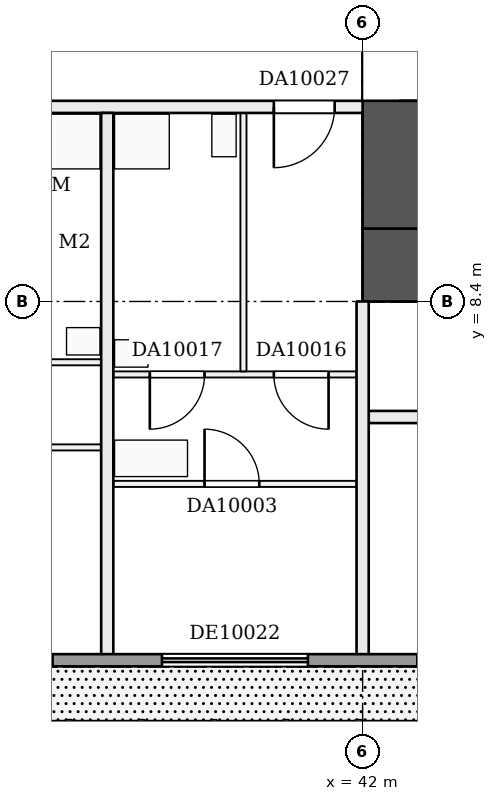
"""IFC4 building model, lengths in metres.
Left out: names, types, materials, properties, quantities, classifications, styles, units other than length and angle.
Written with IfcOpenShell. Run it as: python <this file> out.ifc"""

import sys

from ifc_helpers import new_model, si_unit, direction, frame, frame_2d, origin, place, context, subcontext, project, spatial, rectangle, extrude, element, fill, save


model = new_model("IFC4")
c1 = context("Model", 3, precision=1e-05, world=origin(), true_north=direction((0.0, 1.0)))
c2 = subcontext(c1, "Body", "Model", "MODEL_VIEW")
j1 = project(units=[si_unit("LENGTHUNIT", "METRE"), si_unit("PLANEANGLEUNIT", "RADIAN")], contexts=[c1])
p1 = place(None, origin())
s1 = spatial("IfcSite", under=j1, at=p1, CompositionType="ELEMENT")
p2 = place(p1, origin())
s2 = spatial("IfcBuilding", under=s1, at=p2, CompositionType="ELEMENT")
p3 = place(p2, frame((0.0, 0.0, 46.2)))
s3 = spatial("IfcBuildingStorey", under=s2, at=p3, CompositionType="ELEMENT", Elevation=46.2)
p4 = place(p3, frame((42.0, 9.0, 0.0), z_axis=(0.0, 0.0, 1.0), x_axis=(1.0, 0.0, 0.0)))
e1 = element("IfcWall", 1, at=p4, inside=s3, PredefinedType="SHEAR", context=c2, shape_type="SweptSolid", body=[
    extrude(rectangle(XDim=16.8, YDim=1.2, at=frame_2d((8.4, 0.0))), origin(), (0.0, 0.0, 1.0), 3.22),
])
p5 = place(p4, frame((3.1, 0.0, 0.0)))
e2 = element("IfcOpeningElement", 2, at=p5, cuts=e1, PredefinedType="OPENING", context=c2, shape_type="SweptSolid", body=[
    extrude(rectangle(XDim=1.0, YDim=2.1, at=frame_2d((0.5, 1.05))), frame((0.0, 0.61, 0.0), z_axis=(0.0, -1.0, 0.0), x_axis=(1.0, 0.0, 0.0)), (0.0, 0.0, 1.0), 1.22),
])
p6 = place(p4, frame((12.7, 0.0, 0.0)))
e3 = element("IfcOpeningElement", 3, at=p6, cuts=e1, PredefinedType="OPENING", context=c2, shape_type="SweptSolid", body=[
    extrude(rectangle(XDim=1.0, YDim=2.1, at=frame_2d((0.5, 1.05))), frame((0.0, 0.61, 0.0), z_axis=(0.0, -1.0, 0.0), x_axis=(1.0, 0.0, 0.0)), (0.0, 0.0, 1.0), 1.22),
])
p7 = place(p3, frame((42.6, 9.6, 0.0), z_axis=(0.0, 0.0, 1.0), x_axis=(0.0, 1.0, 0.0)))
e4 = element("IfcWall", 4, at=p7, inside=s3, PredefinedType="SHEAR", context=c2, shape_type="SweptSolid", body=[
    extrude(rectangle(XDim=14.4, YDim=1.2, at=frame_2d((7.2, 0.0))), origin(), (0.0, 0.0, 1.0), 3.22),
])
p8 = place(p7, frame((2.1, 0.0, 0.0)))
e5 = element("IfcOpeningElement", 5, at=p8, cuts=e4, PredefinedType="OPENING", context=c2, shape_type="SweptSolid", body=[
    extrude(rectangle(XDim=1.8, YDim=2.1, at=frame_2d((0.9, 1.05))), frame((0.0, 0.61, 0.0), z_axis=(0.0, -1.0, 0.0), x_axis=(1.0, 0.0, 0.0)), (0.0, 0.0, 1.0), 1.22),
])
p9 = place(p3, frame((37.9, 5.4, 0.0), z_axis=(0.0, 0.0, 1.0), x_axis=(1.0, 0.0, 0.0)))
e6 = element("IfcWall", 6, at=p9, inside=s3, PredefinedType="PARTITIONING", context=c2, shape_type="SweptSolid", body=[
    extrude(rectangle(XDim=4.0, YDim=0.1, at=frame_2d((2.0, 0.0))), origin(), (0.0, 0.0, 1.0), 3.22),
])
p10 = place(p9, frame((1.5, 0.0, 0.0)))
e7 = element("IfcOpeningElement", 7, at=p10, cuts=e6, PredefinedType="OPENING", context=c2, shape_type="SweptSolid", body=[
    extrude(rectangle(XDim=0.9, YDim=2.1, at=frame_2d((0.45, 1.05))), frame((0.0, 0.06, 0.0), z_axis=(0.0, -1.0, 0.0), x_axis=(1.0, 0.0, 0.0)), (0.0, 0.0, 1.0), 0.12),
])
p11 = place(p3, frame((12.65, 6.0, 0.0), z_axis=(0.0, 0.0, 1.0), x_axis=(1.0, 0.0, 0.0)))
e8 = element("IfcWall", 8, at=p11, inside=s3, PredefinedType="PARTITIONING", context=c2, shape_type="SweptSolid", body=[
    extrude(rectangle(XDim=25.05, YDim=0.1, at=frame_2d((12.525, 0.0))), origin(), (0.0, 0.0, 1.0), 3.22),
])
p12 = place(p11, frame((1.65, 0.0, 0.0)))
e9 = element("IfcOpeningElement", 9, at=p12, cuts=e8, PredefinedType="OPENING", context=c2, shape_type="SweptSolid", body=[
    extrude(rectangle(XDim=0.9, YDim=2.1, at=frame_2d((0.45, 1.05))), frame((0.0, 0.06, 0.0), z_axis=(0.0, -1.0, 0.0), x_axis=(1.0, 0.0, 0.0)), (0.0, 0.0, 1.0), 0.12),
])
p13 = place(p11, frame((5.75, 0.0, 0.0)))
e10 = element("IfcOpeningElement", 10, at=p13, cuts=e8, PredefinedType="OPENING", context=c2, shape_type="SweptSolid", body=[
    extrude(rectangle(XDim=0.9, YDim=2.1, at=frame_2d((0.45, 1.05))), frame((0.0, 0.06, 0.0), z_axis=(0.0, -1.0, 0.0), x_axis=(1.0, 0.0, 0.0)), (0.0, 0.0, 1.0), 0.12),
])
p14 = place(p11, frame((10.05, 0.0, 0.0)))
e11 = element("IfcOpeningElement", 11, at=p14, cuts=e8, PredefinedType="OPENING", context=c2, shape_type="SweptSolid", body=[
    extrude(rectangle(XDim=0.9, YDim=2.1, at=frame_2d((0.45, 1.05))), frame((0.0, 0.06, 0.0), z_axis=(0.0, -1.0, 0.0), x_axis=(1.0, 0.0, 0.0)), (0.0, 0.0, 1.0), 0.12),
])
p15 = place(p11, frame((14.15, 0.0, 0.0)))
e12 = element("IfcOpeningElement", 12, at=p15, cuts=e8, PredefinedType="OPENING", context=c2, shape_type="SweptSolid", body=[
    extrude(rectangle(XDim=0.9, YDim=2.1, at=frame_2d((0.45, 1.05))), frame((0.0, 0.06, 0.0), z_axis=(0.0, -1.0, 0.0), x_axis=(1.0, 0.0, 0.0)), (0.0, 0.0, 1.0), 0.12),
])
p16 = place(p11, frame((20.45, 0.0, 0.0)))
e13 = element("IfcOpeningElement", 13, at=p16, cuts=e8, PredefinedType="OPENING", context=c2, shape_type="SweptSolid", body=[
    extrude(rectangle(XDim=0.9, YDim=2.1, at=frame_2d((0.45, 1.05))), frame((0.0, 0.06, 0.0), z_axis=(0.0, -1.0, 0.0), x_axis=(1.0, 0.0, 0.0)), (0.0, 0.0, 1.0), 0.12),
])
p17 = place(p3, frame((42.1, 6.5, 0.0), z_axis=(0.0, 0.0, 1.0), x_axis=(1.0, 0.0, 0.0)))
e14 = element("IfcWall", 14, at=p17, inside=s3, PredefinedType="PARTITIONING", context=c2, shape_type="SweptSolid", body=[
    extrude(rectangle(XDim=18.7, YDim=0.2, at=frame_2d((9.35, 0.0))), origin(), (0.0, 0.0, 1.0), 3.22),
])
p18 = place(p17, frame((1.5, 0.0, 0.0)))
e15 = element("IfcOpeningElement", 15, at=p18, cuts=e14, PredefinedType="OPENING", context=c2, shape_type="SweptSolid", body=[
    extrude(rectangle(XDim=1.0, YDim=2.1, at=frame_2d((0.5, 1.05))), frame((0.0, 0.11, 0.0), z_axis=(0.0, -1.0, 0.0), x_axis=(1.0, 0.0, 0.0)), (0.0, 0.0, 1.0), 0.22),
])
p19 = place(p17, frame((6.7, 0.0, 0.0)))
e16 = element("IfcOpeningElement", 16, at=p19, cuts=e14, PredefinedType="OPENING", context=c2, shape_type="SweptSolid", body=[
    extrude(rectangle(XDim=1.0, YDim=2.1, at=frame_2d((0.5, 1.05))), frame((0.0, 0.11, 0.0), z_axis=(0.0, -1.0, 0.0), x_axis=(1.0, 0.0, 0.0)), (0.0, 0.0, 1.0), 0.22),
])
p20 = place(p17, frame((14.1, 0.0, 0.0)))
e17 = element("IfcOpeningElement", 17, at=p20, cuts=e14, PredefinedType="OPENING", context=c2, shape_type="SweptSolid", body=[
    extrude(rectangle(XDim=1.0, YDim=2.1, at=frame_2d((0.5, 1.05))), frame((0.0, 0.11, 0.0), z_axis=(0.0, -1.0, 0.0), x_axis=(1.0, 0.0, 0.0)), (0.0, 0.0, 1.0), 0.22),
])
p21 = place(p17, frame((17.1, 0.0, 0.0)))
e18 = element("IfcOpeningElement", 18, at=p21, cuts=e14, PredefinedType="OPENING", context=c2, shape_type="SweptSolid", body=[
    extrude(rectangle(XDim=1.0, YDim=2.1, at=frame_2d((0.5, 1.05))), frame((0.0, 0.11, 0.0), z_axis=(0.0, -1.0, 0.0), x_axis=(1.0, 0.0, 0.0)), (0.0, 0.0, 1.0), 0.22),
])
p22 = place(p3, frame((37.9, 7.2, 0.0), z_axis=(0.0, 0.0, 1.0), x_axis=(1.0, 0.0, 0.0)))
e19 = element("IfcWall", 19, at=p22, inside=s3, PredefinedType="PARTITIONING", context=c2, shape_type="SweptSolid", body=[
    extrude(rectangle(XDim=4.0, YDim=0.1, at=frame_2d((2.0, 0.0))), origin(), (0.0, 0.0, 1.0), 3.22),
])
p23 = place(p22, frame((2.64, 0.0, 0.0)))
e20 = element("IfcOpeningElement", 20, at=p23, cuts=e19, PredefinedType="OPENING", context=c2, shape_type="SweptSolid", body=[
    extrude(rectangle(XDim=0.9, YDim=2.1, at=frame_2d((0.45, 1.05))), frame((0.0, 0.06, 0.0), z_axis=(0.0, -1.0, 0.0), x_axis=(1.0, 0.0, 0.0)), (0.0, 0.0, 1.0), 0.12),
])
p24 = place(p22, frame((0.6, 0.0, 0.0)))
e21 = element("IfcOpeningElement", 21, at=p24, cuts=e19, PredefinedType="OPENING", context=c2, shape_type="SweptSolid", body=[
    extrude(rectangle(XDim=0.9, YDim=2.1, at=frame_2d((0.45, 1.05))), frame((0.0, 0.06, 0.0), z_axis=(0.0, -1.0, 0.0), x_axis=(1.0, 0.0, 0.0)), (0.0, 0.0, 1.0), 0.12),
])
p25 = place(p3, frame((25.3, 7.4, 0.0), z_axis=(0.0, 0.0, 1.0), x_axis=(1.0, 0.0, 0.0)))
e22 = element("IfcWall", 22, at=p25, inside=s3, PredefinedType="PARTITIONING", context=c2, shape_type="SweptSolid", body=[
    extrude(rectangle(XDim=12.4, YDim=0.1, at=frame_2d((6.2, 0.0))), origin(), (0.0, 0.0, 1.0), 3.22),
])
p26 = place(p25, frame((1.0, 0.0, 0.0)))
e23 = element("IfcOpeningElement", 23, at=p26, cuts=e22, PredefinedType="OPENING", context=c2, shape_type="SweptSolid", body=[
    extrude(rectangle(XDim=0.9, YDim=2.1, at=frame_2d((0.45, 1.05))), frame((0.0, 0.06, 0.0), z_axis=(0.0, -1.0, 0.0), x_axis=(1.0, 0.0, 0.0)), (0.0, 0.0, 1.0), 0.12),
])
p27 = place(p25, frame((3.8, 0.0, 0.0)))
e24 = element("IfcOpeningElement", 24, at=p27, cuts=e22, PredefinedType="OPENING", context=c2, shape_type="SweptSolid", body=[
    extrude(rectangle(XDim=0.9, YDim=2.1, at=frame_2d((0.45, 1.05))), frame((0.0, 0.06, 0.0), z_axis=(0.0, -1.0, 0.0), x_axis=(1.0, 0.0, 0.0)), (0.0, 0.0, 1.0), 0.12),
])
p28 = place(p25, frame((6.5, 0.0, 0.0)))
e25 = element("IfcOpeningElement", 25, at=p28, cuts=e22, PredefinedType="OPENING", context=c2, shape_type="SweptSolid", body=[
    extrude(rectangle(XDim=0.9, YDim=2.1, at=frame_2d((0.45, 1.05))), frame((0.0, 0.06, 0.0), z_axis=(0.0, -1.0, 0.0), x_axis=(1.0, 0.0, 0.0)), (0.0, 0.0, 1.0), 0.12),
])
p29 = place(p25, frame((10.4, 0.0, 0.0)))
e26 = element("IfcOpeningElement", 26, at=p29, cuts=e22, PredefinedType="OPENING", context=c2, shape_type="SweptSolid", body=[
    extrude(rectangle(XDim=0.9, YDim=2.1, at=frame_2d((0.45, 1.05))), frame((0.0, 0.06, 0.0), z_axis=(0.0, -1.0, 0.0), x_axis=(1.0, 0.0, 0.0)), (0.0, 0.0, 1.0), 0.12),
])
p30 = place(p3, frame((11.5, 11.6, 0.0), z_axis=(0.0, 0.0, 1.0), x_axis=(1.0, 0.0, 0.0)))
e27 = element("IfcWall", 27, at=p30, inside=s3, PredefinedType="PARTITIONING", context=c2, shape_type="SweptSolid", body=[
    extrude(rectangle(XDim=30.5, YDim=0.2, at=frame_2d((15.25, 0.0))), origin(), (0.0, 0.0, 1.0), 3.22),
])
p31 = place(p30, frame((1.6, 0.0, 0.0)))
e28 = element("IfcOpeningElement", 28, at=p31, cuts=e27, PredefinedType="OPENING", context=c2, shape_type="SweptSolid", body=[
    extrude(rectangle(XDim=1.0, YDim=2.1, at=frame_2d((0.5, 1.05))), frame((0.0, 0.11, 0.0), z_axis=(0.0, -1.0, 0.0), x_axis=(1.0, 0.0, 0.0)), (0.0, 0.0, 1.0), 0.22),
])
p32 = place(p30, frame((6.0, 0.0, 0.0)))
e29 = element("IfcOpeningElement", 29, at=p32, cuts=e27, PredefinedType="OPENING", context=c2, shape_type="SweptSolid", body=[
    extrude(rectangle(XDim=1.0, YDim=2.1, at=frame_2d((0.5, 1.05))), frame((0.0, 0.11, 0.0), z_axis=(0.0, -1.0, 0.0), x_axis=(1.0, 0.0, 0.0)), (0.0, 0.0, 1.0), 0.22),
])
p33 = place(p30, frame((14.7, 0.0, 0.0)))
e30 = element("IfcOpeningElement", 30, at=p33, cuts=e27, PredefinedType="OPENING", context=c2, shape_type="SweptSolid", body=[
    extrude(rectangle(XDim=1.0, YDim=2.1, at=frame_2d((0.5, 1.05))), frame((0.0, 0.11, 0.0), z_axis=(0.0, -1.0, 0.0), x_axis=(1.0, 0.0, 0.0)), (0.0, 0.0, 1.0), 0.22),
])
p34 = place(p30, frame((29.04, 0.0, 0.0)))
e31 = element("IfcOpeningElement", 31, at=p34, cuts=e27, PredefinedType="OPENING", context=c2, shape_type="SweptSolid", body=[
    extrude(rectangle(XDim=1.0, YDim=2.1, at=frame_2d((0.5, 1.05))), frame((0.0, 0.11, 0.0), z_axis=(0.0, -1.0, 0.0), x_axis=(1.0, 0.0, 0.0)), (0.0, 0.0, 1.0), 0.22),
])
p35 = place(p3, frame((37.8, 2.5, 0.0), z_axis=(0.0, 0.0, 1.0), x_axis=(0.0, 1.0, 0.0)))
e32 = element("IfcWall", 32, at=p35, inside=s3, PredefinedType="PARTITIONING", context=c2, shape_type="SweptSolid", body=[
    extrude(rectangle(XDim=9.0, YDim=0.2, at=frame_2d((4.5, 0.0))), origin(), (0.0, 0.0, 1.0), 3.22),
])
p36 = place(p3, frame((40.04, 7.25, 0.0), z_axis=(0.0, 0.0, 1.0), x_axis=(0.0, 1.0, 0.0)))
e33 = element("IfcWall", 33, at=p36, inside=s3, PredefinedType="PARTITIONING", context=c2, shape_type="SweptSolid", body=[
    extrude(rectangle(XDim=4.25, YDim=0.1, at=frame_2d((2.125, 0.0))), origin(), (0.0, 0.0, 1.0), 3.22),
])
p37 = place(p3, frame((42.0, 2.5, 0.0), z_axis=(0.0, 0.0, 1.0), x_axis=(0.0, 1.0, 0.0)))
e34 = element("IfcWall", 34, at=p37, inside=s3, PredefinedType="PARTITIONING", context=c2, shape_type="SweptSolid", body=[
    extrude(rectangle(XDim=5.9, YDim=0.2, at=frame_2d((2.95, 0.0))), origin(), (0.0, 0.0, 1.0), 3.22),
])
p38 = place(p3, frame((4.8, 2.5, 0.0), z_axis=(0.0, 0.0, 1.0), x_axis=(1.0, 0.0, 0.0)))
e35 = element("IfcWall", 35, at=p38, inside=s3, PredefinedType="SOLIDWALL", context=c2, shape_type="SweptSolid", body=[
    extrude(rectangle(XDim=57.6, YDim=0.2, at=frame_2d((28.8, 0.0))), origin(), (0.0, 0.0, 1.0), 3.22),
])
p39 = place(p38, frame((0.3, 0.0, 0.0)))
e36 = element("IfcOpeningElement", 36, at=p39, cuts=e35, PredefinedType="OPENING", context=c2, shape_type="SweptSolid", body=[
    extrude(rectangle(XDim=2.4, YDim=2.2, at=frame_2d((1.2, 1.1))), frame((0.0, 0.11, 0.0), z_axis=(0.0, -1.0, 0.0), x_axis=(1.0, 0.0, 0.0)), (0.0, 0.0, 1.0), 0.22),
])
p40 = place(p38, frame((4.5, 0.0, 0.9)))
e37 = element("IfcOpeningElement", 37, at=p40, cuts=e35, PredefinedType="OPENING", context=c2, shape_type="SweptSolid", body=[
    extrude(rectangle(XDim=2.4, YDim=1.5, at=frame_2d((1.2, 0.75))), frame((0.0, 0.11, 0.0), z_axis=(0.0, -1.0, 0.0), x_axis=(1.0, 0.0, 0.0)), (0.0, 0.0, 1.0), 0.22),
])
p41 = place(p38, frame((8.7, 0.0, 0.9)))
e38 = element("IfcOpeningElement", 38, at=p41, cuts=e35, PredefinedType="OPENING", context=c2, shape_type="SweptSolid", body=[
    extrude(rectangle(XDim=2.4, YDim=1.5, at=frame_2d((1.2, 0.75))), frame((0.0, 0.11, 0.0), z_axis=(0.0, -1.0, 0.0), x_axis=(1.0, 0.0, 0.0)), (0.0, 0.0, 1.0), 0.22),
])
p42 = place(p38, frame((12.9, 0.0, 0.0)))
e39 = element("IfcOpeningElement", 39, at=p42, cuts=e35, PredefinedType="OPENING", context=c2, shape_type="SweptSolid", body=[
    extrude(rectangle(XDim=2.4, YDim=2.2, at=frame_2d((1.2, 1.1))), frame((0.0, 0.11, 0.0), z_axis=(0.0, -1.0, 0.0), x_axis=(1.0, 0.0, 0.0)), (0.0, 0.0, 1.0), 0.22),
])
p43 = place(p38, frame((17.1, 0.0, 0.9)))
e40 = element("IfcOpeningElement", 40, at=p43, cuts=e35, PredefinedType="OPENING", context=c2, shape_type="SweptSolid", body=[
    extrude(rectangle(XDim=2.4, YDim=1.5, at=frame_2d((1.2, 0.75))), frame((0.0, 0.11, 0.0), z_axis=(0.0, -1.0, 0.0), x_axis=(1.0, 0.0, 0.0)), (0.0, 0.0, 1.0), 0.22),
])
p44 = place(p38, frame((21.3, 0.0, 0.9)))
e41 = element("IfcOpeningElement", 41, at=p44, cuts=e35, PredefinedType="OPENING", context=c2, shape_type="SweptSolid", body=[
    extrude(rectangle(XDim=2.4, YDim=1.5, at=frame_2d((1.2, 0.75))), frame((0.0, 0.11, 0.0), z_axis=(0.0, -1.0, 0.0), x_axis=(1.0, 0.0, 0.0)), (0.0, 0.0, 1.0), 0.22),
])
p45 = place(p38, frame((25.5, 0.0, 0.0)))
e42 = element("IfcOpeningElement", 42, at=p45, cuts=e35, PredefinedType="OPENING", context=c2, shape_type="SweptSolid", body=[
    extrude(rectangle(XDim=2.4, YDim=2.2, at=frame_2d((1.2, 1.1))), frame((0.0, 0.11, 0.0), z_axis=(0.0, -1.0, 0.0), x_axis=(1.0, 0.0, 0.0)), (0.0, 0.0, 1.0), 0.22),
])
p46 = place(p38, frame((29.7, 0.0, 0.0)))
e43 = element("IfcOpeningElement", 43, at=p46, cuts=e35, PredefinedType="OPENING", context=c2, shape_type="SweptSolid", body=[
    extrude(rectangle(XDim=2.4, YDim=2.2, at=frame_2d((1.2, 1.1))), frame((0.0, 0.11, 0.0), z_axis=(0.0, -1.0, 0.0), x_axis=(1.0, 0.0, 0.0)), (0.0, 0.0, 1.0), 0.22),
])
p47 = place(p38, frame((33.9, 0.0, 0.0)))
e44 = element("IfcOpeningElement", 44, at=p47, cuts=e35, PredefinedType="OPENING", context=c2, shape_type="SweptSolid", body=[
    extrude(rectangle(XDim=2.4, YDim=2.2, at=frame_2d((1.2, 1.1))), frame((0.0, 0.11, 0.0), z_axis=(0.0, -1.0, 0.0), x_axis=(1.0, 0.0, 0.0)), (0.0, 0.0, 1.0), 0.22),
])
p48 = place(p38, frame((38.1, 0.0, 0.9)))
e45 = element("IfcOpeningElement", 45, at=p48, cuts=e35, PredefinedType="OPENING", context=c2, shape_type="SweptSolid", body=[
    extrude(rectangle(XDim=2.4, YDim=1.5, at=frame_2d((1.2, 0.75))), frame((0.0, 0.11, 0.0), z_axis=(0.0, -1.0, 0.0), x_axis=(1.0, 0.0, 0.0)), (0.0, 0.0, 1.0), 0.22),
])
p49 = place(p38, frame((42.3, 0.0, 0.9)))
e46 = element("IfcOpeningElement", 46, at=p49, cuts=e35, PredefinedType="OPENING", context=c2, shape_type="SweptSolid", body=[
    extrude(rectangle(XDim=2.4, YDim=1.5, at=frame_2d((1.2, 0.75))), frame((0.0, 0.11, 0.0), z_axis=(0.0, -1.0, 0.0), x_axis=(1.0, 0.0, 0.0)), (0.0, 0.0, 1.0), 0.22),
])
p50 = place(p38, frame((46.5, 0.0, 0.0)))
e47 = element("IfcOpeningElement", 47, at=p50, cuts=e35, PredefinedType="OPENING", context=c2, shape_type="SweptSolid", body=[
    extrude(rectangle(XDim=2.4, YDim=2.2, at=frame_2d((1.2, 1.1))), frame((0.0, 0.11, 0.0), z_axis=(0.0, -1.0, 0.0), x_axis=(1.0, 0.0, 0.0)), (0.0, 0.0, 1.0), 0.22),
])
p51 = place(p38, frame((50.7, 0.0, 0.9)))
e48 = element("IfcOpeningElement", 48, at=p51, cuts=e35, PredefinedType="OPENING", context=c2, shape_type="SweptSolid", body=[
    extrude(rectangle(XDim=2.4, YDim=1.5, at=frame_2d((1.2, 0.75))), frame((0.0, 0.11, 0.0), z_axis=(0.0, -1.0, 0.0), x_axis=(1.0, 0.0, 0.0)), (0.0, 0.0, 1.0), 0.22),
])
p52 = place(p38, frame((54.9, 0.0, 0.9)))
e49 = element("IfcOpeningElement", 49, at=p52, cuts=e35, PredefinedType="OPENING", context=c2, shape_type="SweptSolid", body=[
    extrude(rectangle(XDim=2.4, YDim=1.5, at=frame_2d((1.2, 0.75))), frame((0.0, 0.11, 0.0), z_axis=(0.0, -1.0, 0.0), x_axis=(1.0, 0.0, 0.0)), (0.0, 0.0, 1.0), 0.22),
])
p53 = place(p8, frame((1.8, 0.0, 0.0), z_axis=(0.0, 0.0, 1.0), x_axis=(-1.0, 0.0, 0.0)))
e50 = element("IfcDoor", 50, at=p53, inside=s3, OperationType="DOUBLE_DOOR_SINGLE_SWING", PredefinedType="DOOR", context=c2, shape_type="SweptSolid", body=[
    extrude(rectangle(XDim=1.8, YDim=2.1, at=frame_2d((0.9, 1.05))), frame((0.0, 0.025, 0.0), z_axis=(0.0, -1.0, 0.0), x_axis=(1.0, 0.0, 0.0)), (0.0, 0.0, 1.0), 0.05),
])
fill(e5, e50)
p54 = place(p10, origin())
e51 = element("IfcDoor", 51, at=p54, inside=s3, OperationType="SINGLE_SWING_LEFT", PredefinedType="DOOR", context=c2, shape_type="SweptSolid", body=[
    extrude(rectangle(XDim=0.9, YDim=2.1, at=frame_2d((0.45, 1.05))), frame((0.0, 0.025, 0.0), z_axis=(0.0, -1.0, 0.0), x_axis=(1.0, 0.0, 0.0)), (0.0, 0.0, 1.0), 0.05),
])
fill(e7, e51)
p55 = place(p23, frame((0.9, 0.0, 0.0), z_axis=(0.0, 0.0, 1.0), x_axis=(-1.0, 0.0, 0.0)))
e52 = element("IfcDoor", 52, at=p55, inside=s3, OperationType="SINGLE_SWING_LEFT", PredefinedType="DOOR", context=c2, shape_type="SweptSolid", body=[
    extrude(rectangle(XDim=0.9, YDim=2.1, at=frame_2d((0.45, 1.05))), frame((0.0, 0.025, 0.0), z_axis=(0.0, -1.0, 0.0), x_axis=(1.0, 0.0, 0.0)), (0.0, 0.0, 1.0), 0.05),
])
fill(e20, e52)
p56 = place(p24, frame((0.9, 0.0, 0.0), z_axis=(0.0, 0.0, 1.0), x_axis=(-1.0, 0.0, 0.0)))
e53 = element("IfcDoor", 53, at=p56, inside=s3, OperationType="SINGLE_SWING_RIGHT", PredefinedType="DOOR", context=c2, shape_type="SweptSolid", body=[
    extrude(rectangle(XDim=0.9, YDim=2.1, at=frame_2d((0.45, 1.05))), frame((0.0, 0.025, 0.0), z_axis=(0.0, -1.0, 0.0), x_axis=(1.0, 0.0, 0.0)), (0.0, 0.0, 1.0), 0.05),
])
fill(e21, e53)
p57 = place(p34, frame((1.0, 0.0, 0.0), z_axis=(0.0, 0.0, 1.0), x_axis=(-1.0, 0.0, 0.0)))
e54 = element("IfcDoor", 54, at=p57, inside=s3, OperationType="SINGLE_SWING_RIGHT", PredefinedType="DOOR", context=c2, shape_type="SweptSolid", body=[
    extrude(rectangle(XDim=1.0, YDim=2.1, at=frame_2d((0.5, 1.05))), frame((0.0, 0.025, 0.0), z_axis=(0.0, -1.0, 0.0), x_axis=(1.0, 0.0, 0.0)), (0.0, 0.0, 1.0), 0.05),
])
fill(e31, e54)
p58 = place(p47, origin())
e55 = element("IfcDoor", 55, at=p58, inside=s3, OperationType="DOUBLE_DOOR_SLIDING", PredefinedType="DOOR", context=c2, shape_type="SweptSolid", body=[
    extrude(rectangle(XDim=2.4, YDim=2.2, at=frame_2d((1.2, 1.1))), frame((0.0, 0.025, 0.0), z_axis=(0.0, -1.0, 0.0), x_axis=(1.0, 0.0, 0.0)), (0.0, 0.0, 1.0), 0.05),
])
fill(e44, e55)
save(model, sys.argv[1])
